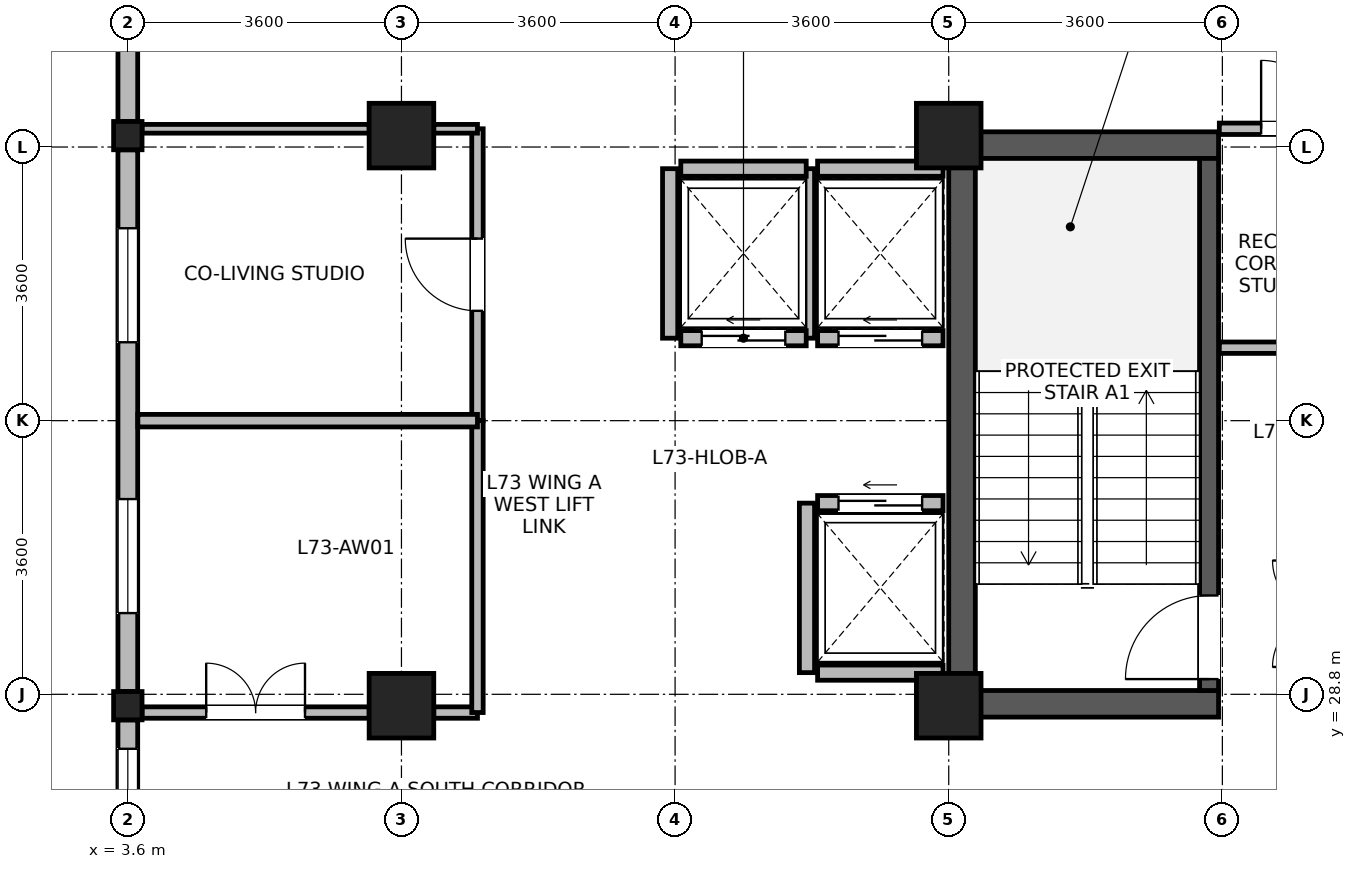
"""IFC4 building model, lengths in metres.
Left out: names, types, materials, properties, quantities, classifications, styles, units other than length and angle.
Written with IfcOpenShell. Run it as: python <this file> out.ifc"""

import sys

from ifc_helpers import new_model, si_unit, direction, frame, frame_2d, origin, origin_2d, place, context, subcontext, project, spatial, rectangle, i_section, extrude, source, transform, mapped, element, fill, save


model = new_model("IFC4")
c1 = context("Model", 3, precision=1e-05, world=origin(), true_north=direction((0.0, 1.0)))
c2 = subcontext(c1, "Body", "Model", "MODEL_VIEW")
j1 = project(units=[si_unit("LENGTHUNIT", "METRE"), si_unit("PLANEANGLEUNIT", "RADIAN")], contexts=[c1])
p1 = place(None, origin())
s1 = spatial("IfcSite", under=j1, at=p1, CompositionType="ELEMENT")
p2 = place(p1, origin())
s2 = spatial("IfcBuilding", under=s1, at=p2, CompositionType="ELEMENT")
p3 = place(p2, frame((0.0, 0.0, 283.2)))
s3 = spatial("IfcBuildingStorey", under=s2, at=p3, CompositionType="ELEMENT", Elevation=283.2)
p4 = place(p3, frame((14.575, 28.5, 0.0), z_axis=(0.0, 0.0, 1.0), x_axis=(0.0, 1.0, 0.0)))
e1 = element("IfcWall", 1, at=p4, inside=s3, PredefinedType="SHEAR", context=c2, shape_type="SweptSolid", body=[
    extrude(rectangle(XDim=7.7, YDim=0.35, at=frame_2d((3.85, 0.0))), origin(), (0.0, 0.0, 1.0), 3.475),
])
for number, where, z_axis, x_axis in (
    (2, (14.75, 28.675, 0.0), (0.0, 0.0, 1.0), (1.0, 0.0, 0.0)),
    (3, (14.75, 36.025, 0.0), (0.0, 0.0, 1.0), (1.0, 0.0, 0.0)),
):
    element("IfcWall", number, at=place(p3, frame(where, z_axis=z_axis, x_axis=x_axis)), inside=s3, PredefinedType="SHEAR", context=c2, shape_type="SweptSolid", body=[
        extrude(rectangle(XDim=3.2, YDim=0.35, at=frame_2d((1.6, 0.0))), origin(), (0.0, 0.0, 1.0), 3.475),
    ])
p5 = place(p3, frame((17.825, 28.85, 0.0), z_axis=(0.0, 0.0, 1.0), x_axis=(0.0, 1.0, 0.0)))
e4 = element("IfcWall", 4, at=p5, inside=s3, PredefinedType="SHEAR", context=c2, shape_type="SweptSolid", body=[
    extrude(rectangle(XDim=7.0, YDim=0.25, at=frame_2d((3.5, 0.0))), origin(), (0.0, 0.0, 1.0), 3.475),
])
p6 = place(p5, frame((0.15, 0.0, 0.0)))
e5 = element("IfcOpeningElement", 5, at=p6, cuts=e4, PredefinedType="OPENING", context=c2, shape_type="SweptSolid", body=[
    extrude(rectangle(XDim=1.1, YDim=2.08, at=frame_2d((0.55, 1.04))), frame((0.0, 0.135, 0.0), z_axis=(0.0, -1.0, 0.0), x_axis=(1.0, 0.0, 0.0)), (0.0, 0.0, 1.0), 0.27),
])
m1 = source(origin(), c2, "Body", "SweptSolid", [
    extrude(rectangle(XDim=0.85, YDim=0.85, at=origin_2d()), origin(), (0.0, 0.0, 1.0), 3.7),
])
for number, where, z_axis, x_axis in (
    (6, (7.2, 28.65, 0.0), (0.0, 0.0, 1.0), (1.0, 0.0, 0.0)),
    (7, (7.2, 36.15, 0.0), (0.0, 0.0, 1.0), (1.0, 0.0, 0.0)),
    (8, (14.4, 28.65, 0.0), (0.0, 0.0, 1.0), (1.0, 0.0, 0.0)),
    (9, (14.4, 36.15, 0.0), (0.0, 0.0, 1.0), (1.0, 0.0, 0.0)),
):
    element("IfcColumn", number, at=place(p3, frame(where, z_axis=z_axis, x_axis=x_axis)), inside=s3, PredefinedType="COLUMN", context=c2, shape_type="MappedRepresentation", body=[
        mapped(m1, transform((0.0, 0.0, 0.0), x_axis=(1.0, 0.0, 0.0), y_axis=(0.0, 1.0, 0.0), z_axis=(0.0, 0.0, 1.0), scale=1.0)),
    ])
m2 = source(origin(), c2, "Body", "SweptSolid", [
    extrude(i_section(OverallWidth=0.374, OverallDepth=0.372, WebThickness=0.015, FlangeThickness=0.026, FilletRadius=0.015, at=origin_2d()), origin(), (0.0, 0.0, 1.0), 3.7),
])
for number, where, z_axis, x_axis in (
    (10, (3.6, 28.65, 0.0), (0.0, 0.0, 1.0), (1.0, 0.0, 0.0)),
    (11, (3.6, 36.15, 0.0), (0.0, 0.0, 1.0), (1.0, 0.0, 0.0)),
):
    element("IfcColumn", number, at=place(p3, frame(where, z_axis=z_axis, x_axis=x_axis)), inside=s3, PredefinedType="COLUMN", context=c2, shape_type="MappedRepresentation", body=[
        mapped(m2, transform((0.0, 0.0, 0.0), x_axis=(1.0, 0.0, 0.0), y_axis=(0.0, 1.0, 0.0), z_axis=(0.0, 0.0, 1.0), scale=1.0)),
    ])
p7 = place(p3, frame((3.6, 36.337, 0.0), z_axis=(0.0, 0.0, 1.0), x_axis=(0.0, 1.0, 0.0)))
e12 = element("IfcWall", 12, at=p7, inside=s3, PredefinedType="STANDARD", context=c2, shape_type="SweptSolid", body=[
    extrude(rectangle(XDim=3.393, YDim=0.26, at=frame_2d((1.697, 0.0))), origin(), (0.0, 0.0, 1.0), 3.455),
])
p8 = place(p7, frame((0.947, 0.0, 0.85)))
e13 = element("IfcOpeningElement", 13, at=p8, cuts=e12, PredefinedType="OPENING", context=c2, shape_type="SweptSolid", body=[
    extrude(rectangle(XDim=1.5, YDim=1.85, at=frame_2d((0.75, 0.925))), frame((0.0, 0.14, 0.0), z_axis=(0.0, -1.0, 0.0), x_axis=(1.0, 0.0, 0.0)), (0.0, 0.0, 1.0), 0.28),
])
p9 = place(p3, frame((3.6, 28.837, 0.0), z_axis=(0.0, 0.0, 1.0), x_axis=(0.0, 1.0, 0.0)))
e14 = element("IfcWall", 14, at=p9, inside=s3, PredefinedType="STANDARD", context=c2, shape_type="SweptSolid", body=[
    extrude(rectangle(XDim=7.126, YDim=0.26, at=frame_2d((3.563, 0.0))), origin(), (0.0, 0.0, 1.0), 3.055),
])
p10 = place(p9, frame((1.031, 0.0, 0.85)))
e15 = element("IfcOpeningElement", 15, at=p10, cuts=e14, PredefinedType="OPENING", context=c2, shape_type="SweptSolid", body=[
    extrude(rectangle(XDim=1.5, YDim=1.85, at=frame_2d((0.75, 0.925))), frame((0.0, 0.14, 0.0), z_axis=(0.0, -1.0, 0.0), x_axis=(1.0, 0.0, 0.0)), (0.0, 0.0, 1.0), 0.28),
])
p11 = place(p9, frame((4.594, 0.0, 0.85)))
e16 = element("IfcOpeningElement", 16, at=p11, cuts=e14, PredefinedType="OPENING", context=c2, shape_type="SweptSolid", body=[
    extrude(rectangle(XDim=1.5, YDim=1.85, at=frame_2d((0.75, 0.925))), frame((0.0, 0.14, 0.0), z_axis=(0.0, -1.0, 0.0), x_axis=(1.0, 0.0, 0.0)), (0.0, 0.0, 1.0), 0.28),
])
p12 = place(p3, frame((3.6, 25.07, 0.0), z_axis=(0.0, 0.0, 1.0), x_axis=(0.0, 1.0, 0.0)))
e17 = element("IfcWall", 17, at=p12, inside=s3, PredefinedType="STANDARD", context=c2, shape_type="SweptSolid", body=[
    extrude(rectangle(XDim=3.393, YDim=0.26, at=frame_2d((1.696, 0.0))), origin(), (0.0, 0.0, 1.0), 3.455),
])
p13 = place(p12, frame((2.063, 0.0, 0.85)))
e18 = element("IfcOpeningElement", 18, at=p13, cuts=e17, PredefinedType="OPENING", context=c2, shape_type="SweptSolid", body=[
    extrude(rectangle(XDim=0.95, YDim=1.75, at=frame_2d((0.475, 0.875))), frame((0.0, 0.14, 0.0), z_axis=(0.0, -1.0, 0.0), x_axis=(1.0, 0.0, 0.0)), (0.0, 0.0, 1.0), 0.28),
])
p14 = place(p3, frame((12.675, 33.485, 0.0), z_axis=(0.0, 0.0, 1.0), x_axis=(1.0, 0.0, 0.0)))
e19 = element("IfcWall", 19, at=p14, inside=s3, PredefinedType="PARTITIONING", context=c2, shape_type="SweptSolid", body=[
    extrude(rectangle(XDim=1.65, YDim=0.2, at=frame_2d((0.825, 0.0))), origin(), (0.0, 0.0, 1.0), 3.455),
])
p15 = place(p14, frame((0.275, 0.0, 0.0)))
e20 = element("IfcOpeningElement", 20, at=p15, cuts=e19, PredefinedType="OPENING", context=c2, shape_type="SweptSolid", body=[
    extrude(rectangle(XDim=1.1, YDim=2.12, at=frame_2d((0.55, 1.06))), frame((0.0, 0.11, 0.0), z_axis=(0.0, -1.0, 0.0), x_axis=(1.0, 0.0, 0.0)), (0.0, 0.0, 1.0), 0.22),
])
p16 = place(p3, frame((12.675, 35.715, 0.0), z_axis=(0.0, 0.0, 1.0), x_axis=(1.0, 0.0, 0.0)))
e21 = element("IfcWall", 21, at=p16, inside=s3, PredefinedType="PARTITIONING", context=c2, shape_type="SweptSolid", body=[
    extrude(rectangle(XDim=1.65, YDim=0.2, at=frame_2d((0.825, 0.0))), origin(), (0.0, 0.0, 1.0), 3.455),
])
p17 = place(p3, frame((12.535, 33.485, 0.0), z_axis=(0.0, 0.0, 1.0), x_axis=(0.0, 1.0, 0.0)))
e22 = element("IfcWall", 22, at=p17, inside=s3, PredefinedType="PARTITIONING", context=c2, shape_type="SweptSolid", body=[
    extrude(rectangle(XDim=2.23, YDim=0.2, at=frame_2d((1.115, 0.0))), origin(), (0.0, 0.0, 1.0), 3.455),
])
p18 = place(p3, frame((12.675, 29.085, 0.0), z_axis=(0.0, 0.0, 1.0), x_axis=(1.0, 0.0, 0.0)))
e23 = element("IfcWall", 23, at=p18, inside=s3, PredefinedType="PARTITIONING", context=c2, shape_type="SweptSolid", body=[
    extrude(rectangle(XDim=1.65, YDim=0.2, at=frame_2d((0.825, 0.0))), origin(), (0.0, 0.0, 1.0), 3.455),
])
p19 = place(p3, frame((12.675, 31.315, 0.0), z_axis=(0.0, 0.0, 1.0), x_axis=(1.0, 0.0, 0.0)))
e24 = element("IfcWall", 24, at=p19, inside=s3, PredefinedType="PARTITIONING", context=c2, shape_type="SweptSolid", body=[
    extrude(rectangle(XDim=1.65, YDim=0.2, at=frame_2d((0.825, 0.0))), origin(), (0.0, 0.0, 1.0), 3.455),
])
p20 = place(p19, frame((0.275, 0.0, 0.0)))
e25 = element("IfcOpeningElement", 25, at=p20, cuts=e24, PredefinedType="OPENING", context=c2, shape_type="SweptSolid", body=[
    extrude(rectangle(XDim=1.1, YDim=2.12, at=frame_2d((0.55, 1.06))), frame((0.0, 0.11, 0.0), z_axis=(0.0, -1.0, 0.0), x_axis=(1.0, 0.0, 0.0)), (0.0, 0.0, 1.0), 0.22),
])
p21 = place(p3, frame((12.535, 29.085, 0.0), z_axis=(0.0, 0.0, 1.0), x_axis=(0.0, 1.0, 0.0)))
e26 = element("IfcWall", 26, at=p21, inside=s3, PredefinedType="PARTITIONING", context=c2, shape_type="SweptSolid", body=[
    extrude(rectangle(XDim=2.23, YDim=0.2, at=frame_2d((1.115, 0.0))), origin(), (0.0, 0.0, 1.0), 3.455),
])
p22 = place(p3, frame((10.875, 33.485, 0.0), z_axis=(0.0, 0.0, 1.0), x_axis=(1.0, 0.0, 0.0)))
e27 = element("IfcWall", 27, at=p22, inside=s3, PredefinedType="PARTITIONING", context=c2, shape_type="SweptSolid", body=[
    extrude(rectangle(XDim=1.65, YDim=0.2, at=frame_2d((0.825, 0.0))), origin(), (0.0, 0.0, 1.0), 3.455),
])
p23 = place(p22, frame((0.275, 0.0, 0.0)))
e28 = element("IfcOpeningElement", 28, at=p23, cuts=e27, PredefinedType="OPENING", context=c2, shape_type="SweptSolid", body=[
    extrude(rectangle(XDim=1.1, YDim=2.12, at=frame_2d((0.55, 1.06))), frame((0.0, 0.11, 0.0), z_axis=(0.0, -1.0, 0.0), x_axis=(1.0, 0.0, 0.0)), (0.0, 0.0, 1.0), 0.22),
])
p24 = place(p3, frame((10.875, 35.715, 0.0), z_axis=(0.0, 0.0, 1.0), x_axis=(1.0, 0.0, 0.0)))
e29 = element("IfcWall", 29, at=p24, inside=s3, PredefinedType="PARTITIONING", context=c2, shape_type="SweptSolid", body=[
    extrude(rectangle(XDim=1.65, YDim=0.2, at=frame_2d((0.825, 0.0))), origin(), (0.0, 0.0, 1.0), 3.455),
])
p25 = place(p3, frame((10.735, 33.485, 0.0), z_axis=(0.0, 0.0, 1.0), x_axis=(0.0, 1.0, 0.0)))
e30 = element("IfcWall", 30, at=p25, inside=s3, PredefinedType="PARTITIONING", context=c2, shape_type="SweptSolid", body=[
    extrude(rectangle(XDim=2.23, YDim=0.2, at=frame_2d((1.115, 0.0))), origin(), (0.0, 0.0, 1.0), 3.455),
])
p26 = place(p3, frame((3.787, 28.56, 0.0), z_axis=(0.0, 0.0, 1.0), x_axis=(1.0, 0.0, 0.0)))
e31 = element("IfcWall", 31, at=p26, inside=s3, PredefinedType="PARTITIONING", context=c2, shape_type="SweptSolid", body=[
    extrude(rectangle(XDim=2.988, YDim=0.15, at=frame_2d((1.494, 0.0))), origin(), (0.0, 0.0, 1.0), 2.905),
])
p27 = place(p26, frame((0.844, 0.0, 0.0)))
e32 = element("IfcOpeningElement", 32, at=p27, cuts=e31, PredefinedType="OPENING", context=c2, shape_type="SweptSolid", body=[
    extrude(rectangle(XDim=1.3, YDim=2.12, at=frame_2d((0.65, 1.06))), frame((0.0, 0.085, 0.0), z_axis=(0.0, -1.0, 0.0), x_axis=(1.0, 0.0, 0.0)), (0.0, 0.0, 1.0), 0.17),
])
p28 = place(p3, frame((7.625, 28.56, 0.0), z_axis=(0.0, 0.0, 1.0), x_axis=(1.0, 0.0, 0.0)))
e33 = element("IfcWall", 33, at=p28, inside=s3, PredefinedType="PARTITIONING", context=c2, shape_type="SweptSolid", body=[
    extrude(rectangle(XDim=0.575, YDim=0.15, at=frame_2d((0.288, 0.0))), origin(), (0.0, 0.0, 1.0), 2.905),
])
p29 = place(p3, frame((8.2, 32.4, 0.0), z_axis=(0.0, 0.0, 1.0), x_axis=(0.0, 1.0, 0.0)))
e34 = element("IfcWall", 34, at=p29, inside=s3, PredefinedType="PARTITIONING", context=c2, shape_type="SweptSolid", body=[
    extrude(rectangle(XDim=3.84, YDim=0.15, at=frame_2d((1.92, 0.0))), origin(), (0.0, 0.0, 1.0), 3.455),
])
p30 = place(p29, frame((1.445, 0.0, 0.0)))
e35 = element("IfcOpeningElement", 35, at=p30, cuts=e34, PredefinedType="OPENING", context=c2, shape_type="SweptSolid", body=[
    extrude(rectangle(XDim=0.95, YDim=2.1, at=frame_2d((0.475, 1.05))), frame((0.0, 0.085, 0.0), z_axis=(0.0, -1.0, 0.0), x_axis=(1.0, 0.0, 0.0)), (0.0, 0.0, 1.0), 0.17),
])
p31 = place(p3, frame((8.2, 28.56, 0.0), z_axis=(0.0, 0.0, 1.0), x_axis=(0.0, 1.0, 0.0)))
e36 = element("IfcWall", 36, at=p31, inside=s3, PredefinedType="PARTITIONING", context=c2, shape_type="SweptSolid", body=[
    extrude(rectangle(XDim=3.84, YDim=0.15, at=frame_2d((1.92, 0.0))), origin(), (0.0, 0.0, 1.0), 3.455),
])
p32 = place(p3, frame((17.96, 33.36, 0.0), z_axis=(0.0, 0.0, 1.0), x_axis=(1.0, 0.0, 0.0)))
e37 = element("IfcWall", 37, at=p32, inside=s3, PredefinedType="PARTITIONING", context=c2, shape_type="SweptSolid", body=[
    extrude(rectangle(XDim=2.0, YDim=0.15, at=frame_2d((1.0, 0.0))), origin(), (0.0, 0.0, 1.0), 3.455),
])
p33 = place(p3, frame((17.96, 36.24, 0.0), z_axis=(0.0, 0.0, 1.0), x_axis=(1.0, 0.0, 0.0)))
e38 = element("IfcWall", 38, at=p33, inside=s3, PredefinedType="PARTITIONING", context=c2, shape_type="SweptSolid", body=[
    extrude(rectangle(XDim=2.0, YDim=0.15, at=frame_2d((1.0, 0.0))), origin(), (0.0, 0.0, 1.0), 2.555),
])
p34 = place(p33, frame((0.55, 0.0, 0.0)))
e39 = element("IfcOpeningElement", 39, at=p34, cuts=e38, PredefinedType="OPENING", context=c2, shape_type="SweptSolid", body=[
    extrude(rectangle(XDim=0.9, YDim=2.08, at=frame_2d((0.45, 1.04))), frame((0.0, 0.085, 0.0), z_axis=(0.0, -1.0, 0.0), x_axis=(1.0, 0.0, 0.0)), (0.0, 0.0, 1.0), 0.17),
])
p35 = place(p3, frame((3.732, 32.4, 0.0), z_axis=(0.0, 0.0, 1.0), x_axis=(1.0, 0.0, 0.0)))
e40 = element("IfcWall", 40, at=p35, inside=s3, PredefinedType="PARTITIONING", context=c2, shape_type="SweptSolid", body=[
    extrude(rectangle(XDim=4.468, YDim=0.165, at=frame_2d((2.234, 0.0))), origin(), (0.0, 0.0, 1.0), 3.455),
])
p36 = place(p3, frame((3.787, 36.24, 0.0), z_axis=(0.0, 0.0, 1.0), x_axis=(1.0, 0.0, 0.0)))
e41 = element("IfcWall", 41, at=p36, inside=s3, PredefinedType="PARTITIONING", context=c2, shape_type="SweptSolid", body=[
    extrude(rectangle(XDim=2.988, YDim=0.115, at=frame_2d((1.494, 0.0))), origin(), (0.0, 0.0, 1.0), 2.905),
])
p37 = place(p3, frame((7.625, 36.24, 0.0), z_axis=(0.0, 0.0, 1.0), x_axis=(1.0, 0.0, 0.0)))
e42 = element("IfcWall", 42, at=p37, inside=s3, PredefinedType="PARTITIONING", context=c2, shape_type="SweptSolid", body=[
    extrude(rectangle(XDim=0.575, YDim=0.115, at=frame_2d((0.288, 0.0))), origin(), (0.0, 0.0, 1.0), 2.905),
])
p38 = place(p10, origin())
e43 = element("IfcWindow", 43, at=p38, inside=s3, PartitioningType="SINGLE_PANEL", PredefinedType="WINDOW", context=c2, shape_type="SweptSolid", body=[
    extrude(rectangle(XDim=1.5, YDim=1.85, at=frame_2d((0.75, 0.925))), frame((0.0, 0.03, 0.0), z_axis=(0.0, -1.0, 0.0), x_axis=(1.0, 0.0, 0.0)), (0.0, 0.0, 1.0), 0.06),
])
fill(e15, e43)
p39 = place(p11, origin())
e44 = element("IfcWindow", 44, at=p39, inside=s3, PartitioningType="SINGLE_PANEL", PredefinedType="WINDOW", context=c2, shape_type="SweptSolid", body=[
    extrude(rectangle(XDim=1.5, YDim=1.85, at=frame_2d((0.75, 0.925))), frame((0.0, 0.03, 0.0), z_axis=(0.0, -1.0, 0.0), x_axis=(1.0, 0.0, 0.0)), (0.0, 0.0, 1.0), 0.06),
])
fill(e16, e44)
p40 = place(p13, origin())
e45 = element("IfcWindow", 45, at=p40, inside=s3, PartitioningType="SINGLE_PANEL", PredefinedType="WINDOW", context=c2, shape_type="SweptSolid", body=[
    extrude(rectangle(XDim=0.95, YDim=1.75, at=frame_2d((0.475, 0.875))), frame((0.0, 0.03, 0.0), z_axis=(0.0, -1.0, 0.0), x_axis=(1.0, 0.0, 0.0)), (0.0, 0.0, 1.0), 0.06),
])
fill(e18, e45)
p41 = place(p6, origin())
e46 = element("IfcDoor", 46, at=p41, inside=s3, OperationType="SINGLE_SWING_LEFT", PredefinedType="DOOR", context=c2, shape_type="SweptSolid", body=[
    extrude(rectangle(XDim=1.1, YDim=2.08, at=frame_2d((0.55, 1.04))), frame((0.0, 0.025, 0.0), z_axis=(0.0, -1.0, 0.0), x_axis=(1.0, 0.0, 0.0)), (0.0, 0.0, 1.0), 0.05),
])
fill(e5, e46)
p42 = place(p15, origin())
e47 = element("IfcDoor", 47, at=p42, inside=s3, OperationType="SLIDING_TO_LEFT", PredefinedType="DOOR", context=c2, shape_type="SweptSolid", body=[
    extrude(rectangle(XDim=1.1, YDim=2.12, at=frame_2d((0.55, 1.06))), frame((0.0, 0.025, 0.0), z_axis=(0.0, -1.0, 0.0), x_axis=(1.0, 0.0, 0.0)), (0.0, 0.0, 1.0), 0.05),
])
fill(e20, e47)
p43 = place(p20, origin())
e48 = element("IfcDoor", 48, at=p43, inside=s3, OperationType="SLIDING_TO_LEFT", PredefinedType="DOOR", context=c2, shape_type="SweptSolid", body=[
    extrude(rectangle(XDim=1.1, YDim=2.12, at=frame_2d((0.55, 1.06))), frame((0.0, 0.025, 0.0), z_axis=(0.0, -1.0, 0.0), x_axis=(1.0, 0.0, 0.0)), (0.0, 0.0, 1.0), 0.05),
])
fill(e25, e48)
p44 = place(p23, origin())
e49 = element("IfcDoor", 49, at=p44, inside=s3, OperationType="SLIDING_TO_LEFT", PredefinedType="DOOR", context=c2, shape_type="SweptSolid", body=[
    extrude(rectangle(XDim=1.1, YDim=2.12, at=frame_2d((0.55, 1.06))), frame((0.0, 0.025, 0.0), z_axis=(0.0, -1.0, 0.0), x_axis=(1.0, 0.0, 0.0)), (0.0, 0.0, 1.0), 0.05),
])
fill(e28, e49)
p45 = place(p27, origin())
e50 = element("IfcDoor", 50, at=p45, inside=s3, OperationType="DOUBLE_DOOR_SINGLE_SWING", PredefinedType="DOOR", context=c2, shape_type="SweptSolid", body=[
    extrude(rectangle(XDim=1.3, YDim=2.12, at=frame_2d((0.65, 1.06))), frame((0.0, 0.025, 0.0), z_axis=(0.0, -1.0, 0.0), x_axis=(1.0, 0.0, 0.0)), (0.0, 0.0, 1.0), 0.05),
])
fill(e32, e50)
p46 = place(p30, origin())
e51 = element("IfcDoor", 51, at=p46, inside=s3, OperationType="SINGLE_SWING_RIGHT", PredefinedType="DOOR", context=c2, shape_type="SweptSolid", body=[
    extrude(rectangle(XDim=0.95, YDim=2.1, at=frame_2d((0.475, 1.05))), frame((0.0, 0.025, 0.0), z_axis=(0.0, -1.0, 0.0), x_axis=(1.0, 0.0, 0.0)), (0.0, 0.0, 1.0), 0.05),
])
fill(e35, e51)
p47 = place(p34, origin())
e52 = element("IfcDoor", 52, at=p47, inside=s3, OperationType="SINGLE_SWING_LEFT", PredefinedType="DOOR", context=c2, shape_type="SweptSolid", body=[
    extrude(rectangle(XDim=0.9, YDim=2.08, at=frame_2d((0.45, 1.04))), frame((0.0, 0.025, 0.0), z_axis=(0.0, -1.0, 0.0), x_axis=(1.0, 0.0, 0.0)), (0.0, 0.0, 1.0), 0.05),
])
fill(e39, e52)
save(model, sys.argv[1])
